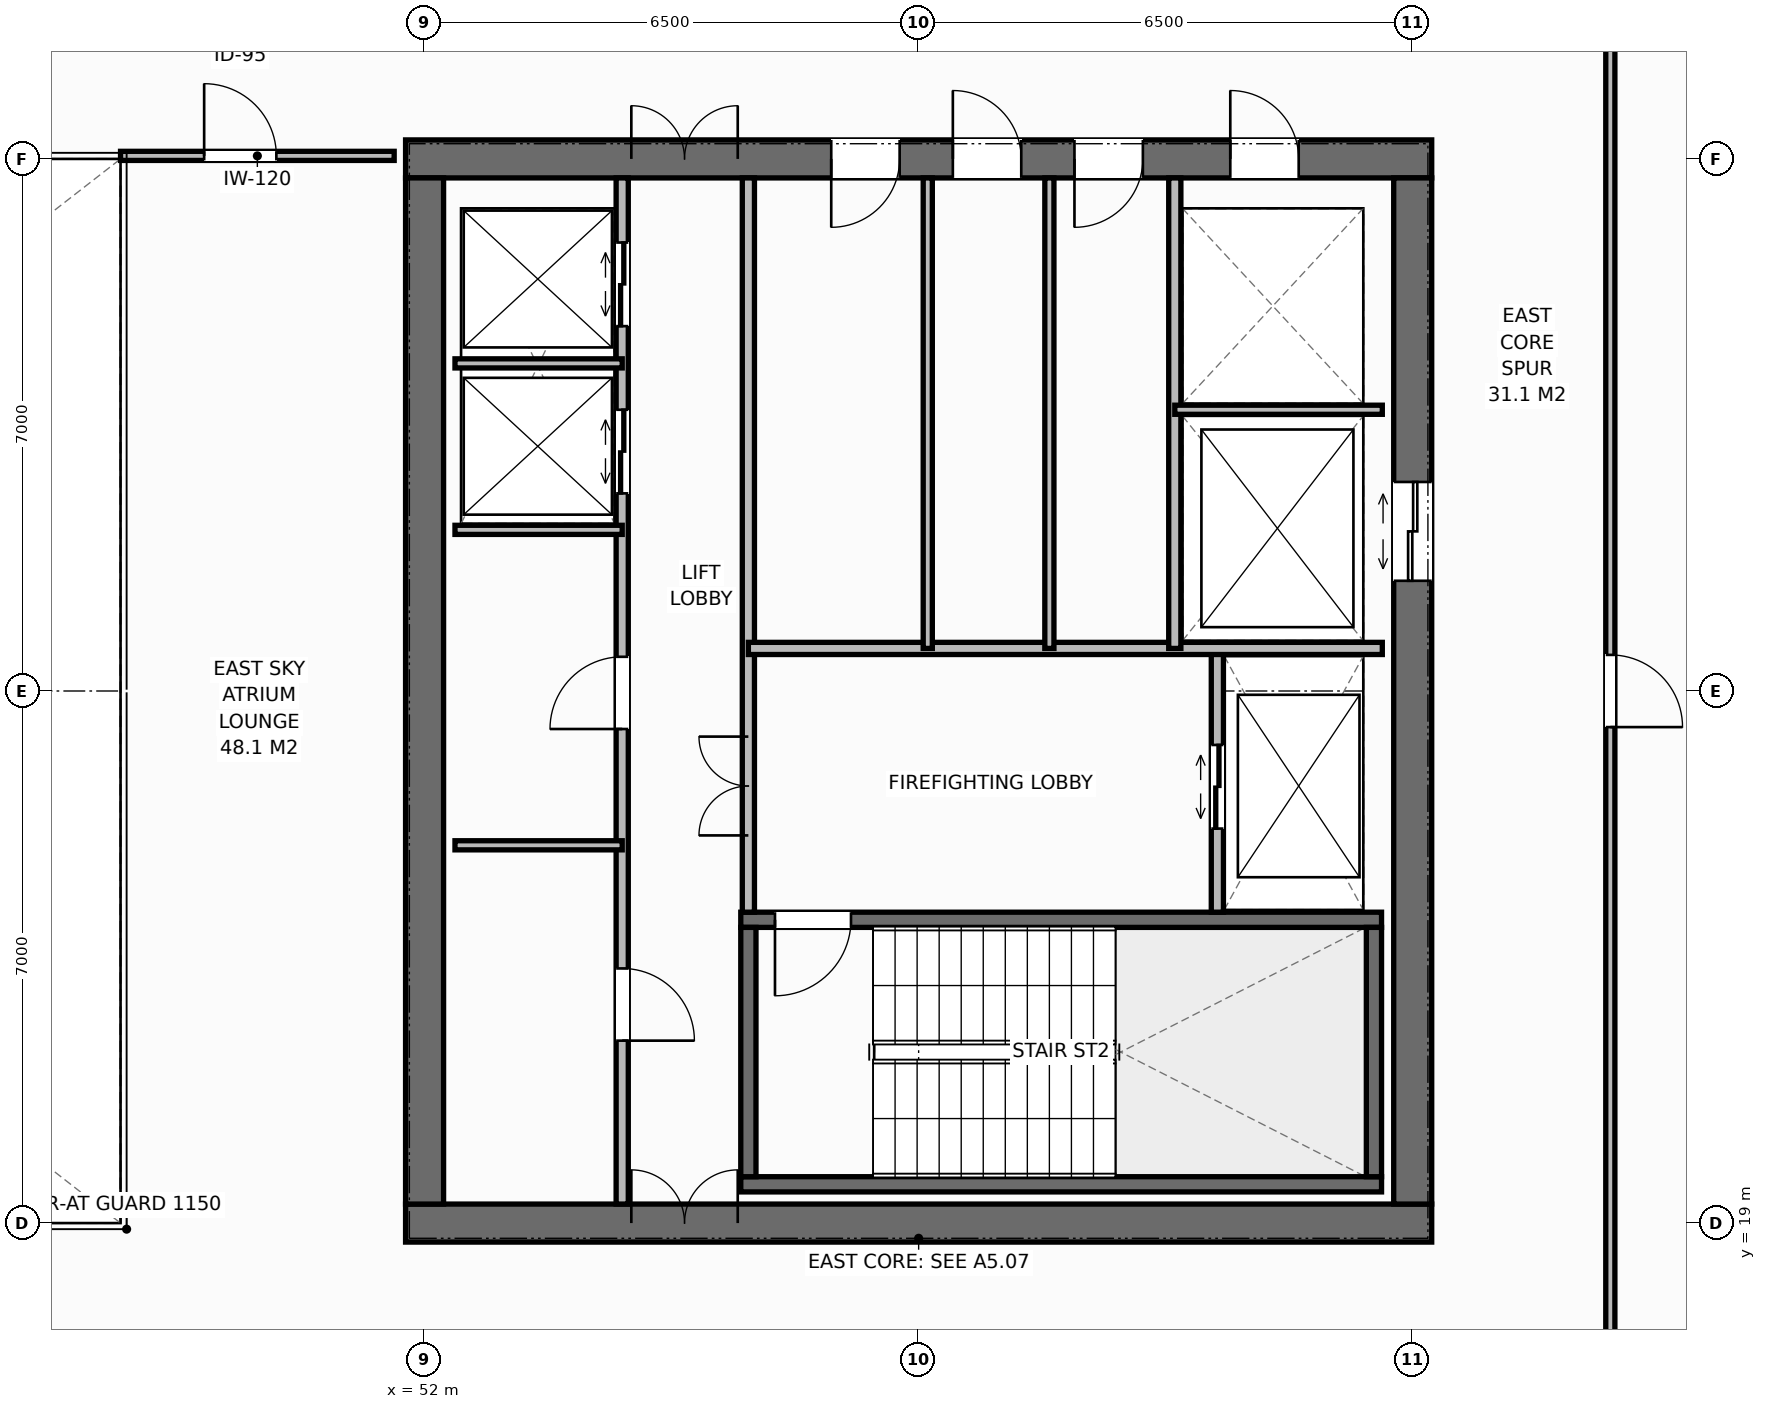
"""IFC4 building model, lengths in metres.
Left out: names, types, materials, properties, quantities, classifications, styles, units other than length and angle.
Written with IfcOpenShell. Run it as: python <this file> out.ifc"""

import sys

from ifc_helpers import new_model, si_unit, direction, frame, frame_2d, origin, place, context, subcontext, project, spatial, rectangle, extrude, element, fill, save


model = new_model("IFC4")
c1 = context("Model", 3, precision=1e-05, world=origin(), true_north=direction((0.0, 1.0)))
c2 = subcontext(c1, "Body", "Model", "MODEL_VIEW")
j1 = project(units=[si_unit("LENGTHUNIT", "METRE"), si_unit("PLANEANGLEUNIT", "RADIAN")], contexts=[c1])
p1 = place(None, origin())
s1 = spatial("IfcSite", under=j1, at=p1, CompositionType="ELEMENT")
p2 = place(p1, origin())
s2 = spatial("IfcBuilding", under=s1, at=p2, CompositionType="ELEMENT")
p3 = place(p2, frame((0.0, 0.0, 282.4)))
s3 = spatial("IfcBuildingStorey", under=s2, at=p3, CompositionType="ELEMENT", Elevation=282.4)
p4 = place(p3, frame((51.75, 19.0, 0.0), z_axis=(0.0, 0.0, 1.0), x_axis=(1.0, 0.0, 0.0)))
e1 = element("IfcWall", 1, at=p4, inside=s3, PredefinedType="SHEAR", context=c2, shape_type="SweptSolid", body=[
    extrude(rectangle(XDim=13.5, YDim=0.5, at=frame_2d((6.75, 0.0))), origin(), (0.0, 0.0, 1.0), 4.0),
])
p5 = place(p4, frame((2.97, 0.0, 0.0)))
e2 = element("IfcOpeningElement", 2, at=p5, cuts=e1, PredefinedType="OPENING", context=c2, shape_type="SweptSolid", body=[
    extrude(rectangle(XDim=1.4, YDim=2.2, at=frame_2d((0.7, 1.1))), frame((0.0, 0.26, 0.0), z_axis=(0.0, -1.0, 0.0), x_axis=(1.0, 0.0, 0.0)), (0.0, 0.0, 1.0), 0.52),
])
p6 = place(p3, frame((51.75, 33.0, 0.0), z_axis=(0.0, 0.0, 1.0), x_axis=(1.0, 0.0, 0.0)))
e3 = element("IfcWall", 3, at=p6, inside=s3, PredefinedType="SHEAR", context=c2, shape_type="SweptSolid", body=[
    extrude(rectangle(XDim=13.5, YDim=0.5, at=frame_2d((6.75, 0.0))), origin(), (0.0, 0.0, 1.0), 4.0),
])
p7 = place(p6, frame((2.97, 0.0, 0.0)))
e4 = element("IfcOpeningElement", 4, at=p7, cuts=e3, PredefinedType="OPENING", context=c2, shape_type="SweptSolid", body=[
    extrude(rectangle(XDim=1.4, YDim=2.2, at=frame_2d((0.7, 1.1))), frame((0.0, 0.26, 0.0), z_axis=(0.0, -1.0, 0.0), x_axis=(1.0, 0.0, 0.0)), (0.0, 0.0, 1.0), 0.52),
])
p8 = place(p6, frame((10.85, 0.0, 0.0)))
e5 = element("IfcOpeningElement", 5, at=p8, cuts=e3, PredefinedType="OPENING", context=c2, shape_type="SweptSolid", body=[
    extrude(rectangle(XDim=0.9, YDim=2.15, at=frame_2d((0.45, 1.075))), frame((0.0, 0.26, 0.0), z_axis=(0.0, -1.0, 0.0), x_axis=(1.0, 0.0, 0.0)), (0.0, 0.0, 1.0), 0.52),
])
p9 = place(p6, frame((5.6, 0.0, 0.0)))
e6 = element("IfcOpeningElement", 6, at=p9, cuts=e3, PredefinedType="OPENING", context=c2, shape_type="SweptSolid", body=[
    extrude(rectangle(XDim=0.9, YDim=2.15, at=frame_2d((0.45, 1.075))), frame((0.0, 0.26, 0.0), z_axis=(0.0, -1.0, 0.0), x_axis=(1.0, 0.0, 0.0)), (0.0, 0.0, 1.0), 0.52),
])
p10 = place(p6, frame((7.2, 0.0, 0.0)))
e7 = element("IfcOpeningElement", 7, at=p10, cuts=e3, PredefinedType="OPENING", context=c2, shape_type="SweptSolid", body=[
    extrude(rectangle(XDim=0.9, YDim=2.15, at=frame_2d((0.45, 1.075))), frame((0.0, 0.26, 0.0), z_axis=(0.0, -1.0, 0.0), x_axis=(1.0, 0.0, 0.0)), (0.0, 0.0, 1.0), 0.52),
])
p11 = place(p6, frame((8.8, 0.0, 0.0)))
e8 = element("IfcOpeningElement", 8, at=p11, cuts=e3, PredefinedType="OPENING", context=c2, shape_type="SweptSolid", body=[
    extrude(rectangle(XDim=0.9, YDim=2.15, at=frame_2d((0.45, 1.075))), frame((0.0, 0.26, 0.0), z_axis=(0.0, -1.0, 0.0), x_axis=(1.0, 0.0, 0.0)), (0.0, 0.0, 1.0), 0.52),
])
p12 = place(p3, frame((52.0, 19.25, 0.0), z_axis=(0.0, 0.0, 1.0), x_axis=(0.0, 1.0, 0.0)))
e9 = element("IfcWall", 9, at=p12, inside=s3, PredefinedType="SHEAR", context=c2, shape_type="SweptSolid", body=[
    extrude(rectangle(XDim=13.5, YDim=0.5, at=frame_2d((6.75, 0.0))), origin(), (0.0, 0.0, 1.0), 4.0),
])
p13 = place(p3, frame((65.0, 19.25, 0.0), z_axis=(0.0, 0.0, 1.0), x_axis=(0.0, 1.0, 0.0)))
e10 = element("IfcWall", 10, at=p13, inside=s3, PredefinedType="SHEAR", context=c2, shape_type="SweptSolid", body=[
    extrude(rectangle(XDim=13.5, YDim=0.5, at=frame_2d((6.75, 0.0))), origin(), (0.0, 0.0, 1.0), 4.0),
])
p14 = place(p13, frame((8.2, 0.0, 0.0)))
e11 = element("IfcOpeningElement", 11, at=p14, cuts=e10, PredefinedType="OPENING", context=c2, shape_type="SweptSolid", body=[
    extrude(rectangle(XDim=1.3, YDim=2.2, at=frame_2d((0.65, 1.1))), frame((0.0, 0.26, 0.0), z_axis=(0.0, -1.0, 0.0), x_axis=(1.0, 0.0, 0.0)), (0.0, 0.0, 1.0), 0.52),
])
p15 = place(p3, frame((56.16, 19.51, 0.0), z_axis=(0.0, 0.0, 1.0), x_axis=(1.0, 0.0, 0.0)))
e12 = element("IfcWall", 12, at=p15, inside=s3, PredefinedType="SHEAR", context=c2, shape_type="SweptSolid", body=[
    extrude(rectangle(XDim=8.43, YDim=0.2, at=frame_2d((4.215, 0.0))), origin(), (0.0, 0.0, 1.0), 4.0),
])
p16 = place(p3, frame((56.16, 22.99, 0.0), z_axis=(0.0, 0.0, 1.0), x_axis=(1.0, 0.0, 0.0)))
e13 = element("IfcWall", 13, at=p16, inside=s3, PredefinedType="SHEAR", context=c2, shape_type="SweptSolid", body=[
    extrude(rectangle(XDim=8.43, YDim=0.2, at=frame_2d((4.215, 0.0))), origin(), (0.0, 0.0, 1.0), 4.0),
])
p17 = place(p16, frame((0.45, 0.0, 0.0)))
e14 = element("IfcOpeningElement", 14, at=p17, cuts=e13, PredefinedType="OPENING", context=c2, shape_type="SweptSolid", body=[
    extrude(rectangle(XDim=1.0, YDim=2.15, at=frame_2d((0.5, 1.075))), frame((0.0, 0.11, 0.0), z_axis=(0.0, -1.0, 0.0), x_axis=(1.0, 0.0, 0.0)), (0.0, 0.0, 1.0), 0.22),
])
for number, where, z_axis, x_axis in (
    (15, (56.26, 19.61, 0.0), (0.0, 0.0, 1.0), (0.0, 1.0, 0.0)),
    (16, (64.49, 19.61, 0.0), (0.0, 0.0, 1.0), (0.0, 1.0, 0.0)),
):
    element("IfcWall", number, at=place(p3, frame(where, z_axis=z_axis, x_axis=x_axis)), inside=s3, PredefinedType="SHEAR", context=c2, shape_type="SweptSolid", body=[
        extrude(rectangle(XDim=3.28, YDim=0.2, at=frame_2d((1.64, 0.0))), origin(), (0.0, 0.0, 1.0), 4.0),
    ])
p18 = place(p3, frame((54.6, 19.25, 0.0), z_axis=(0.0, 0.0, 1.0), x_axis=(0.0, 1.0, 0.0)))
e17 = element("IfcWall", 17, at=p18, inside=s3, PredefinedType="STANDARD", context=c2, shape_type="SweptSolid", body=[
    extrude(rectangle(XDim=13.5, YDim=0.16, at=frame_2d((6.75, 0.0))), origin(), (0.0, 0.0, 1.0), 3.788),
])
p19 = place(p18, frame((2.15, 0.0, 0.0)))
e18 = element("IfcOpeningElement", 18, at=p19, cuts=e17, PredefinedType="OPENING", context=c2, shape_type="SweptSolid", body=[
    extrude(rectangle(XDim=0.95, YDim=2.15, at=frame_2d((0.475, 1.075))), frame((0.0, 0.09, 0.0), z_axis=(0.0, -1.0, 0.0), x_axis=(1.0, 0.0, 0.0)), (0.0, 0.0, 1.0), 0.18),
])
p20 = place(p18, frame((6.25, 0.0, 0.0)))
e19 = element("IfcOpeningElement", 19, at=p20, cuts=e17, PredefinedType="OPENING", context=c2, shape_type="SweptSolid", body=[
    extrude(rectangle(XDim=0.95, YDim=2.15, at=frame_2d((0.475, 1.075))), frame((0.0, 0.09, 0.0), z_axis=(0.0, -1.0, 0.0), x_axis=(1.0, 0.0, 0.0)), (0.0, 0.0, 1.0), 0.18),
])
p21 = place(p18, frame((9.35, 0.0, 0.0)))
e20 = element("IfcOpeningElement", 20, at=p21, cuts=e17, PredefinedType="OPENING", context=c2, shape_type="SweptSolid", body=[
    extrude(rectangle(XDim=1.1, YDim=2.2, at=frame_2d((0.55, 1.1))), frame((0.0, 0.09, 0.0), z_axis=(0.0, -1.0, 0.0), x_axis=(1.0, 0.0, 0.0)), (0.0, 0.0, 1.0), 0.18),
])
p22 = place(p18, frame((11.55, 0.0, 0.0)))
e21 = element("IfcOpeningElement", 21, at=p22, cuts=e17, PredefinedType="OPENING", context=c2, shape_type="SweptSolid", body=[
    extrude(rectangle(XDim=1.1, YDim=2.2, at=frame_2d((0.55, 1.1))), frame((0.0, 0.09, 0.0), z_axis=(0.0, -1.0, 0.0), x_axis=(1.0, 0.0, 0.0)), (0.0, 0.0, 1.0), 0.18),
])
p23 = place(p3, frame((56.26, 23.09, 0.0), z_axis=(0.0, 0.0, 1.0), x_axis=(0.0, 1.0, 0.0)))
e22 = element("IfcWall", 22, at=p23, inside=s3, PredefinedType="STANDARD", context=c2, shape_type="SweptSolid", body=[
    extrude(rectangle(XDim=9.66, YDim=0.16, at=frame_2d((4.83, 0.0))), origin(), (0.0, 0.0, 1.0), 3.788),
])
p24 = place(p23, frame((1.01, 0.0, 0.0)))
e23 = element("IfcOpeningElement", 23, at=p24, cuts=e22, PredefinedType="OPENING", context=c2, shape_type="SweptSolid", body=[
    extrude(rectangle(XDim=1.3, YDim=2.2, at=frame_2d((0.65, 1.1))), frame((0.0, 0.09, 0.0), z_axis=(0.0, -1.0, 0.0), x_axis=(1.0, 0.0, 0.0)), (0.0, 0.0, 1.0), 0.18),
])
for number, where, z_axis, x_axis in (
    (24, (52.4, 23.97, 0.0), (0.0, 0.0, 1.0), (1.0, 0.0, 0.0)),
    (25, (52.4, 28.12, 0.0), (0.0, 0.0, 1.0), (1.0, 0.0, 0.0)),
    (26, (52.4, 30.31, 0.0), (0.0, 0.0, 1.0), (1.0, 0.0, 0.0)),
):
    element("IfcWall", number, at=place(p3, frame(where, z_axis=z_axis, x_axis=x_axis)), inside=s3, PredefinedType="PARTITIONING", context=c2, shape_type="SweptSolid", body=[
        extrude(rectangle(XDim=2.2, YDim=0.12, at=frame_2d((1.1, 0.0))), origin(), (0.0, 0.0, 1.0), 3.788),
    ])
p25 = place(p3, frame((62.43, 23.09, 0.0), z_axis=(0.0, 0.0, 1.0), x_axis=(0.0, 1.0, 0.0)))
e27 = element("IfcWall", 27, at=p25, inside=s3, PredefinedType="STANDARD", context=c2, shape_type="SweptSolid", body=[
    extrude(rectangle(XDim=3.47, YDim=0.16, at=frame_2d((1.735, 0.0))), origin(), (0.0, 0.0, 1.0), 3.788),
])
p26 = place(p25, frame((1.1, 0.0, 0.0)))
e28 = element("IfcOpeningElement", 28, at=p26, cuts=e27, PredefinedType="OPENING", context=c2, shape_type="SweptSolid", body=[
    extrude(rectangle(XDim=1.1, YDim=2.2, at=frame_2d((0.55, 1.1))), frame((0.0, 0.09, 0.0), z_axis=(0.0, -1.0, 0.0), x_axis=(1.0, 0.0, 0.0)), (0.0, 0.0, 1.0), 0.18),
])
p27 = place(p3, frame((56.26, 26.56, 0.0), z_axis=(0.0, 0.0, 1.0), x_axis=(1.0, 0.0, 0.0)))
e29 = element("IfcWall", 29, at=p27, inside=s3, PredefinedType="STANDARD", context=c2, shape_type="SweptSolid", body=[
    extrude(rectangle(XDim=8.34, YDim=0.16, at=frame_2d((4.17, 0.0))), origin(), (0.0, 0.0, 1.0), 3.788),
])
p28 = place(p3, frame((61.87, 26.56, 0.0), z_axis=(0.0, 0.0, 1.0), x_axis=(0.0, 1.0, 0.0)))
e30 = element("IfcWall", 30, at=p28, inside=s3, PredefinedType="STANDARD", context=c2, shape_type="SweptSolid", body=[
    extrude(rectangle(XDim=6.19, YDim=0.16, at=frame_2d((3.095, 0.0))), origin(), (0.0, 0.0, 1.0), 3.788),
])
p29 = place(p3, frame((61.87, 29.7, 0.0), z_axis=(0.0, 0.0, 1.0), x_axis=(1.0, 0.0, 0.0)))
e31 = element("IfcWall", 31, at=p29, inside=s3, PredefinedType="PARTITIONING", context=c2, shape_type="SweptSolid", body=[
    extrude(rectangle(XDim=2.73, YDim=0.12, at=frame_2d((1.365, 0.0))), origin(), (0.0, 0.0, 1.0), 3.788),
])
for number, where, z_axis, x_axis in (
    (32, (58.62, 26.56, 0.0), (0.0, 0.0, 1.0), (0.0, 1.0, 0.0)),
    (33, (60.22, 26.56, 0.0), (0.0, 0.0, 1.0), (0.0, 1.0, 0.0)),
):
    element("IfcWall", number, at=place(p3, frame(where, z_axis=z_axis, x_axis=x_axis)), inside=s3, PredefinedType="PARTITIONING", context=c2, shape_type="SweptSolid", body=[
        extrude(rectangle(XDim=6.19, YDim=0.12, at=frame_2d((3.095, 0.0))), origin(), (0.0, 0.0, 1.0), 3.788),
    ])
p30 = place(p3, frame((48.0, 33.04, 0.0), z_axis=(0.0, 0.0, 1.0), x_axis=(1.0, 0.0, 0.0)))
e34 = element("IfcWall", 34, at=p30, inside=s3, PredefinedType="PARTITIONING", context=c2, shape_type="SweptSolid", body=[
    extrude(rectangle(XDim=3.6, YDim=0.12, at=frame_2d((1.8, 0.0))), origin(), (0.0, 0.0, 1.0), 3.528),
])
p31 = place(p30, frame((1.1, 0.0, 0.0)))
e35 = element("IfcOpeningElement", 35, at=p31, cuts=e34, PredefinedType="OPENING", context=c2, shape_type="SweptSolid", body=[
    extrude(rectangle(XDim=0.95, YDim=2.15, at=frame_2d((0.475, 1.075))), frame((0.0, 0.07, 0.0), z_axis=(0.0, -1.0, 0.0), x_axis=(1.0, 0.0, 0.0)), (0.0, 0.0, 1.0), 0.14),
])
p32 = place(p3, frame((67.6, 16.5, 0.0), z_axis=(0.0, 0.0, 1.0), x_axis=(0.0, 1.0, 0.0)))
e36 = element("IfcWall", 36, at=p32, inside=s3, PredefinedType="PARTITIONING", context=c2, shape_type="SweptSolid", body=[
    extrude(rectangle(XDim=19.0, YDim=0.12, at=frame_2d((9.5, 0.0))), origin(), (0.0, 0.0, 1.0), 3.788),
])
p33 = place(p32, frame((9.025, 0.0, 0.0)))
e37 = element("IfcOpeningElement", 37, at=p33, cuts=e36, PredefinedType="OPENING", context=c2, shape_type="SweptSolid", body=[
    extrude(rectangle(XDim=0.95, YDim=2.15, at=frame_2d((0.475, 1.075))), frame((0.0, 0.07, 0.0), z_axis=(0.0, -1.0, 0.0), x_axis=(1.0, 0.0, 0.0)), (0.0, 0.0, 1.0), 0.14),
])
p34 = place(p5, origin())
e38 = element("IfcDoor", 38, at=p34, inside=s3, OperationType="DOUBLE_DOOR_SINGLE_SWING", PredefinedType="DOOR", context=c2, shape_type="SweptSolid", body=[
    extrude(rectangle(XDim=1.4, YDim=2.2, at=frame_2d((0.7, 1.1))), frame((0.0, 0.075, 0.0), z_axis=(0.0, -1.0, 0.0), x_axis=(1.0, 0.0, 0.0)), (0.0, 0.0, 1.0), 0.05),
])
fill(e2, e38)
p35 = place(p7, origin())
e39 = element("IfcDoor", 39, at=p35, inside=s3, OperationType="DOUBLE_DOOR_SINGLE_SWING", PredefinedType="DOOR", context=c2, shape_type="SweptSolid", body=[
    extrude(rectangle(XDim=1.4, YDim=2.2, at=frame_2d((0.7, 1.1))), frame((0.0, -0.025, 0.0), z_axis=(0.0, -1.0, 0.0), x_axis=(1.0, 0.0, 0.0)), (0.0, 0.0, 1.0), 0.05),
])
fill(e4, e39)
p36 = place(p19, origin())
e40 = element("IfcDoor", 40, at=p36, inside=s3, OperationType="SINGLE_SWING_RIGHT", PredefinedType="DOOR", context=c2, shape_type="SweptSolid", body=[
    extrude(rectangle(XDim=0.95, YDim=2.15, at=frame_2d((0.475, 1.075))), frame((0.0, 0.025, 0.0), z_axis=(0.0, -1.0, 0.0), x_axis=(1.0, 0.0, 0.0)), (0.0, 0.0, 1.0), 0.05),
])
fill(e18, e40)
p37 = place(p20, origin())
e41 = element("IfcDoor", 41, at=p37, inside=s3, OperationType="SINGLE_SWING_LEFT", PredefinedType="DOOR", context=c2, shape_type="SweptSolid", body=[
    extrude(rectangle(XDim=0.95, YDim=2.15, at=frame_2d((0.475, 1.075))), frame((0.0, 0.025, 0.0), z_axis=(0.0, -1.0, 0.0), x_axis=(1.0, 0.0, 0.0)), (0.0, 0.0, 1.0), 0.05),
])
fill(e19, e41)
p38 = place(p21, origin())
e42 = element("IfcDoor", 42, at=p38, inside=s3, OperationType="DOUBLE_DOOR_SLIDING", PredefinedType="DOOR", context=c2, shape_type="SweptSolid", body=[
    extrude(rectangle(XDim=1.1, YDim=2.2, at=frame_2d((0.55, 1.1))), frame((0.0, 0.025, 0.0), z_axis=(0.0, -1.0, 0.0), x_axis=(1.0, 0.0, 0.0)), (0.0, 0.0, 1.0), 0.05),
])
fill(e20, e42)
p39 = place(p22, origin())
e43 = element("IfcDoor", 43, at=p39, inside=s3, OperationType="DOUBLE_DOOR_SLIDING", PredefinedType="DOOR", context=c2, shape_type="SweptSolid", body=[
    extrude(rectangle(XDim=1.1, YDim=2.2, at=frame_2d((0.55, 1.1))), frame((0.0, 0.025, 0.0), z_axis=(0.0, -1.0, 0.0), x_axis=(1.0, 0.0, 0.0)), (0.0, 0.0, 1.0), 0.05),
])
fill(e21, e43)
p40 = place(p17, origin())
e44 = element("IfcDoor", 44, at=p40, inside=s3, OperationType="SINGLE_SWING_RIGHT", PredefinedType="DOOR", context=c2, shape_type="SweptSolid", body=[
    extrude(rectangle(XDim=1.0, YDim=2.15, at=frame_2d((0.5, 1.075))), frame((0.0, 0.025, 0.0), z_axis=(0.0, -1.0, 0.0), x_axis=(1.0, 0.0, 0.0)), (0.0, 0.0, 1.0), 0.05),
])
fill(e14, e44)
p41 = place(p26, origin())
e45 = element("IfcDoor", 45, at=p41, inside=s3, OperationType="DOUBLE_DOOR_SLIDING", PredefinedType="DOOR", context=c2, shape_type="SweptSolid", body=[
    extrude(rectangle(XDim=1.1, YDim=2.2, at=frame_2d((0.55, 1.1))), frame((0.0, 0.025, 0.0), z_axis=(0.0, -1.0, 0.0), x_axis=(1.0, 0.0, 0.0)), (0.0, 0.0, 1.0), 0.05),
])
fill(e28, e45)
p42 = place(p24, origin())
e46 = element("IfcDoor", 46, at=p42, inside=s3, OperationType="DOUBLE_DOOR_SINGLE_SWING", PredefinedType="DOOR", context=c2, shape_type="SweptSolid", body=[
    extrude(rectangle(XDim=1.3, YDim=2.2, at=frame_2d((0.65, 1.1))), frame((0.0, 0.025, 0.0), z_axis=(0.0, -1.0, 0.0), x_axis=(1.0, 0.0, 0.0)), (0.0, 0.0, 1.0), 0.05),
])
fill(e23, e46)
p43 = place(p14, origin())
e47 = element("IfcDoor", 47, at=p43, inside=s3, OperationType="DOUBLE_DOOR_SLIDING", PredefinedType="DOOR", context=c2, shape_type="SweptSolid", body=[
    extrude(rectangle(XDim=1.3, YDim=2.2, at=frame_2d((0.65, 1.1))), frame((0.0, 0.025, 0.0), z_axis=(0.0, -1.0, 0.0), x_axis=(1.0, 0.0, 0.0)), (0.0, 0.0, 1.0), 0.05),
])
fill(e11, e47)
p44 = place(p8, origin())
e48 = element("IfcDoor", 48, at=p44, inside=s3, OperationType="SINGLE_SWING_LEFT", PredefinedType="DOOR", context=c2, shape_type="SweptSolid", body=[
    extrude(rectangle(XDim=0.9, YDim=2.15, at=frame_2d((0.45, 1.075))), frame((0.0, -0.025, 0.0), z_axis=(0.0, -1.0, 0.0), x_axis=(1.0, 0.0, 0.0)), (0.0, 0.0, 1.0), 0.05),
])
fill(e5, e48)
p45 = place(p9, origin())
e49 = element("IfcDoor", 49, at=p45, inside=s3, OperationType="SINGLE_SWING_RIGHT", PredefinedType="DOOR", context=c2, shape_type="SweptSolid", body=[
    extrude(rectangle(XDim=0.9, YDim=2.15, at=frame_2d((0.45, 1.075))), frame((0.0, -0.025, 0.0), z_axis=(0.0, -1.0, 0.0), x_axis=(1.0, 0.0, 0.0)), (0.0, 0.0, 1.0), 0.05),
])
fill(e6, e49)
p46 = place(p10, origin())
e50 = element("IfcDoor", 50, at=p46, inside=s3, OperationType="SINGLE_SWING_LEFT", PredefinedType="DOOR", context=c2, shape_type="SweptSolid", body=[
    extrude(rectangle(XDim=0.9, YDim=2.15, at=frame_2d((0.45, 1.075))), frame((0.0, -0.025, 0.0), z_axis=(0.0, -1.0, 0.0), x_axis=(1.0, 0.0, 0.0)), (0.0, 0.0, 1.0), 0.05),
])
fill(e7, e50)
p47 = place(p11, origin())
e51 = element("IfcDoor", 51, at=p47, inside=s3, OperationType="SINGLE_SWING_RIGHT", PredefinedType="DOOR", context=c2, shape_type="SweptSolid", body=[
    extrude(rectangle(XDim=0.9, YDim=2.15, at=frame_2d((0.45, 1.075))), frame((0.0, -0.025, 0.0), z_axis=(0.0, -1.0, 0.0), x_axis=(1.0, 0.0, 0.0)), (0.0, 0.0, 1.0), 0.05),
])
fill(e8, e51)
p48 = place(p31, origin())
e52 = element("IfcDoor", 52, at=p48, inside=s3, OperationType="SINGLE_SWING_LEFT", PredefinedType="DOOR", context=c2, shape_type="SweptSolid", body=[
    extrude(rectangle(XDim=0.95, YDim=2.15, at=frame_2d((0.475, 1.075))), frame((0.0, 0.025, 0.0), z_axis=(0.0, -1.0, 0.0), x_axis=(1.0, 0.0, 0.0)), (0.0, 0.0, 1.0), 0.05),
])
fill(e35, e52)
p49 = place(p33, origin())
e53 = element("IfcDoor", 53, at=p49, inside=s3, OperationType="SINGLE_SWING_RIGHT", PredefinedType="DOOR", context=c2, shape_type="SweptSolid", body=[
    extrude(rectangle(XDim=0.95, YDim=2.15, at=frame_2d((0.475, 1.075))), frame((0.0, 0.025, 0.0), z_axis=(0.0, -1.0, 0.0), x_axis=(1.0, 0.0, 0.0)), (0.0, 0.0, 1.0), 0.05),
])
fill(e37, e53)
save(model, sys.argv[1])
